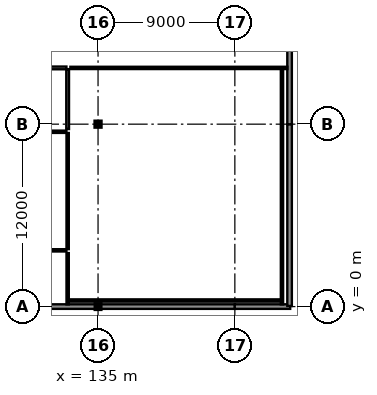
"""IFC4 building model, lengths in metres.
Left out: names, types, materials, properties, quantities, classifications, styles, units other than length and angle.
Written with IfcOpenShell. Run it as: python <this file> out.ifc"""

import sys

from ifc_helpers import new_model, si_unit, direction, frame, frame_2d, origin, origin_2d, place, context, subcontext, project, spatial, rectangle, i_section, extrude, element, fill, save


model = new_model("IFC4")
c1 = context("Model", 3, precision=1e-05, world=origin(), true_north=direction((0.0, 1.0)))
c2 = subcontext(c1, "Body", "Model", "MODEL_VIEW")
j1 = project(units=[si_unit("LENGTHUNIT", "METRE"), si_unit("PLANEANGLEUNIT", "RADIAN")], contexts=[c1])
p1 = place(None, origin())
s1 = spatial("IfcSite", under=j1, at=p1, CompositionType="ELEMENT")
p2 = place(p1, origin())
s2 = spatial("IfcBuilding", under=s1, at=p2, CompositionType="ELEMENT")
p3 = place(p2, frame((0.0, 0.0, 18.9)))
s3 = spatial("IfcBuildingStorey", under=s2, at=p3, CompositionType="ELEMENT", Elevation=18.9)
p4 = place(p3, frame((135.0, 0.0, 0.0), z_axis=(0.0, 0.0, 1.0), x_axis=(0.0, 1.0, 0.0)))
e1 = element("IfcColumn", 1, at=p4, inside=s3, PredefinedType="COLUMN", context=c2, shape_type="SweptSolid", body=[
    extrude(i_section(OverallWidth=0.28, OverallDepth=0.28, WebThickness=0.01, FlangeThickness=0.018, at=origin_2d()), origin(), (0.0, 0.0, 1.0), 4.5),
])
p5 = place(p3, frame((135.0, 12.0, 0.0), z_axis=(0.0, 0.0, 1.0), x_axis=(1.0, 0.0, 0.0)))
e2 = element("IfcColumn", 2, at=p5, inside=s3, PredefinedType="COLUMN", context=c2, shape_type="SweptSolid", body=[
    extrude(i_section(OverallWidth=0.3, OverallDepth=0.3, WebThickness=0.011, FlangeThickness=0.019, at=origin_2d()), origin(), (0.0, 0.0, 1.0), 4.5),
])
p6 = place(p3, frame((126.008, 0.0, 0.0), z_axis=(0.0, 0.0, 1.0), x_axis=(1.0, 0.0, 0.0)))
e3 = element("IfcWall", 3, at=p6, inside=s3, PredefinedType="SOLIDWALL", context=c2, shape_type="SweptSolid", body=[
    extrude(rectangle(XDim=8.854, YDim=0.3, at=frame_2d((4.427, 0.0))), origin(), (0.0, 0.0, 1.0), 3.247),
])
p7 = place(p6, frame((1.479, 0.0, 0.85)))
e4 = element("IfcOpeningElement", 4, at=p7, cuts=e3, PredefinedType="OPENING", context=c2, shape_type="SweptSolid", body=[
    extrude(rectangle(XDim=2.0, YDim=2.0, at=frame_2d((1.0, 1.0))), frame((0.0, 0.165, 0.0), z_axis=(0.0, -1.0, 0.0), x_axis=(1.0, 0.0, 0.0)), (0.0, 0.0, 1.0), 0.33),
])
p8 = place(p6, frame((4.752, 0.0, 0.85)))
e5 = element("IfcOpeningElement", 5, at=p8, cuts=e3, PredefinedType="OPENING", context=c2, shape_type="SweptSolid", body=[
    extrude(rectangle(XDim=2.0, YDim=2.0, at=frame_2d((1.0, 1.0))), frame((0.0, 0.165, 0.0), z_axis=(0.0, -1.0, 0.0), x_axis=(1.0, 0.0, 0.0)), (0.0, 0.0, 1.0), 0.33),
])
p9 = place(p3, frame((135.138, 0.0, 0.0), z_axis=(0.0, 0.0, 1.0), x_axis=(1.0, 0.0, 0.0)))
e6 = element("IfcWall", 6, at=p9, inside=s3, PredefinedType="SOLIDWALL", context=c2, shape_type="SweptSolid", body=[
    extrude(rectangle(XDim=8.872, YDim=0.3, at=frame_2d((4.436, 0.0))), origin(), (0.0, 0.0, 1.0), 3.247),
])
p10 = place(p3, frame((143.99, 0.0, 0.0), z_axis=(0.0, 0.0, 1.0), x_axis=(1.0, 0.0, 0.0)))
e7 = element("IfcWall", 7, at=p10, inside=s3, PredefinedType="SOLIDWALL", context=c2, shape_type="SweptSolid", body=[
    extrude(rectangle(XDim=3.65, YDim=0.3, at=frame_2d((1.825, 0.0))), origin(), (0.0, 0.0, 1.0), 3.247),
])
p11 = place(p3, frame((147.6, 0.04, 0.0), z_axis=(0.0, 0.0, 1.0), x_axis=(0.0, 1.0, 0.0)))
e8 = element("IfcWall", 8, at=p11, inside=s3, PredefinedType="SOLIDWALL", context=c2, shape_type="SweptSolid", body=[
    extrude(rectangle(XDim=11.97, YDim=0.3, at=frame_2d((5.985, 0.0))), origin(), (0.0, 0.0, 1.0), 3.555),
])
p12 = place(p11, frame((2.352, 0.0, 0.85)))
e9 = element("IfcOpeningElement", 9, at=p12, cuts=e8, PredefinedType="OPENING", context=c2, shape_type="SweptSolid", body=[
    extrude(rectangle(XDim=2.0, YDim=2.0, at=frame_2d((1.0, 1.0))), frame((0.0, 0.165, 0.0), z_axis=(0.0, -1.0, 0.0), x_axis=(1.0, 0.0, 0.0)), (0.0, 0.0, 1.0), 0.33),
])
p13 = place(p11, frame((7.618, 0.0, 0.85)))
e10 = element("IfcOpeningElement", 10, at=p13, cuts=e8, PredefinedType="OPENING", context=c2, shape_type="SweptSolid", body=[
    extrude(rectangle(XDim=2.0, YDim=2.0, at=frame_2d((1.0, 1.0))), frame((0.0, 0.165, 0.0), z_axis=(0.0, -1.0, 0.0), x_axis=(1.0, 0.0, 0.0)), (0.0, 0.0, 1.0), 0.33),
])
p14 = place(p3, frame((147.6, 11.99, 0.0), z_axis=(0.0, 0.0, 1.0), x_axis=(0.0, 1.0, 0.0)))
e11 = element("IfcWall", 11, at=p14, inside=s3, PredefinedType="SOLIDWALL", context=c2, shape_type="SweptSolid", body=[
    extrude(rectangle(XDim=12.05, YDim=0.3, at=frame_2d((6.025, 0.0))), origin(), (0.0, 0.0, 1.0), 3.555),
])
p15 = place(p14, frame((1.47, 0.0, 0.85)))
e12 = element("IfcOpeningElement", 12, at=p15, cuts=e11, PredefinedType="OPENING", context=c2, shape_type="SweptSolid", body=[
    extrude(rectangle(XDim=2.0, YDim=2.0, at=frame_2d((1.0, 1.0))), frame((0.0, 0.165, 0.0), z_axis=(0.0, -1.0, 0.0), x_axis=(1.0, 0.0, 0.0)), (0.0, 0.0, 1.0), 0.33),
])
p16 = place(p14, frame((7.676, 0.0, 0.85)))
e13 = element("IfcOpeningElement", 13, at=p16, cuts=e11, PredefinedType="OPENING", context=c2, shape_type="SweptSolid", body=[
    extrude(rectangle(XDim=2.0, YDim=2.0, at=frame_2d((1.0, 1.0))), frame((0.0, 0.165, 0.0), z_axis=(0.0, -1.0, 0.0), x_axis=(1.0, 0.0, 0.0)), (0.0, 0.0, 1.0), 0.33),
])
p17 = place(p3, frame((130.18, 11.5, 0.0), z_axis=(0.0, 0.0, 1.0), x_axis=(1.0, 0.0, 0.0)))
e14 = element("IfcWall", 14, at=p17, inside=s3, PredefinedType="PARTITIONING", context=c2, shape_type="SweptSolid", body=[
    extrude(rectangle(XDim=2.74, YDim=0.15, at=frame_2d((1.37, 0.0))), origin(), (0.0, 0.0, 1.0), 4.14),
])
p18 = place(p3, frame((133.0, 11.42, 0.0), z_axis=(0.0, 0.0, 1.0), x_axis=(0.0, -1.0, 0.0)))
e15 = element("IfcWall", 15, at=p18, inside=s3, PredefinedType="PARTITIONING", context=c2, shape_type="SweptSolid", body=[
    extrude(rectangle(XDim=7.64, YDim=0.15, at=frame_2d((3.82, 0.0))), origin(), (0.0, 0.0, 1.0), 4.14),
])
p19 = place(p3, frame((132.92, 3.7, 0.0), z_axis=(0.0, 0.0, 1.0), x_axis=(-1.0, 0.0, 0.0)))
e16 = element("IfcWall", 16, at=p19, inside=s3, PredefinedType="PARTITIONING", context=c2, shape_type="SweptSolid", body=[
    extrude(rectangle(XDim=15.64, YDim=0.15, at=frame_2d((7.82, 0.0))), origin(), (0.0, 0.0, 1.0), 4.14),
])
p20 = place(p3, frame((130.18, 15.7, 0.0), z_axis=(0.0, 0.0, 1.0), x_axis=(1.0, 0.0, 0.0)))
e17 = element("IfcWall", 17, at=p20, inside=s3, PredefinedType="PARTITIONING", context=c2, shape_type="SweptSolid", body=[
    extrude(rectangle(XDim=2.74, YDim=0.18, at=frame_2d((1.37, 0.0))), origin(), (0.0, 0.0, 1.0), 4.14),
])
p21 = place(p3, frame((133.0, 15.62, 0.0), z_axis=(0.0, 0.0, 1.0), x_axis=(0.0, -1.0, 0.0)))
e18 = element("IfcWall", 18, at=p21, inside=s3, PredefinedType="PARTITIONING", context=c2, shape_type="SweptSolid", body=[
    extrude(rectangle(XDim=3.94, YDim=0.18, at=frame_2d((1.97, 0.0))), origin(), (0.0, 0.0, 1.0), 4.14),
])
p22 = place(p3, frame((133.0, 0.145, 0.0), z_axis=(0.0, 0.0, 1.0), x_axis=(0.0, 1.0, 0.0)))
e19 = element("IfcWall", 19, at=p22, inside=s3, PredefinedType="PARTITIONING", context=c2, shape_type="SweptSolid", body=[
    extrude(rectangle(XDim=3.375, YDim=0.15, at=frame_2d((1.688, 0.0))), origin(), (0.0, 0.0, 1.0), 4.14),
])
p23 = place(p3, frame((133.18, 15.7, 0.0), z_axis=(0.0, 0.0, 1.0), x_axis=(1.0, 0.0, 0.0)))
e20 = element("IfcWall", 20, at=p23, inside=s3, PredefinedType="PARTITIONING", context=c2, shape_type="SweptSolid", body=[
    extrude(rectangle(XDim=14.275, YDim=0.15, at=frame_2d((7.138, 0.0))), origin(), (0.0, 0.0, 1.0), 4.14),
])
p24 = place(p23, frame((6.612, 0.0, 0.0)))
e21 = element("IfcOpeningElement", 21, at=p24, cuts=e20, PredefinedType="OPENING", context=c2, shape_type="SweptSolid", body=[
    extrude(rectangle(XDim=1.05, YDim=2.25, at=frame_2d((0.525, 1.125))), frame((0.0, 0.09, 0.0), z_axis=(0.0, -1.0, 0.0), x_axis=(1.0, 0.0, 0.0)), (0.0, 0.0, 1.0), 0.18),
])
p25 = place(p3, frame((147.1, 15.63, 0.0), z_axis=(0.0, 0.0, 1.0), x_axis=(0.0, -1.0, 0.0)))
e22 = element("IfcWall", 22, at=p25, inside=s3, PredefinedType="PARTITIONING", context=c2, shape_type="SweptSolid", body=[
    extrude(rectangle(XDim=15.485, YDim=0.15, at=frame_2d((7.742, 0.0))), origin(), (0.0, 0.0, 1.0), 4.14),
])
p26 = place(p3, frame((147.03, 0.4, 0.0), z_axis=(0.0, 0.0, 1.0), x_axis=(-1.0, 0.0, 0.0)))
e23 = element("IfcWall", 23, at=p26, inside=s3, PredefinedType="PARTITIONING", context=c2, shape_type="SweptSolid", body=[
    extrude(rectangle(XDim=13.96, YDim=0.15, at=frame_2d((6.98, 0.0))), origin(), (0.0, 0.0, 1.0), 4.14),
])
p27 = place(p8, origin())
e24 = element("IfcWindow", 24, at=p27, inside=s3, PartitioningType="SINGLE_PANEL", PredefinedType="WINDOW", context=c2, shape_type="SweptSolid", body=[
    extrude(rectangle(XDim=2.0, YDim=2.0, at=frame_2d((1.0, 1.0))), frame((0.0, 0.03, 0.0), z_axis=(0.0, -1.0, 0.0), x_axis=(1.0, 0.0, 0.0)), (0.0, 0.0, 1.0), 0.06),
])
fill(e5, e24)
p28 = place(p12, origin())
e25 = element("IfcWindow", 25, at=p28, inside=s3, PartitioningType="SINGLE_PANEL", PredefinedType="WINDOW", context=c2, shape_type="SweptSolid", body=[
    extrude(rectangle(XDim=2.0, YDim=2.0, at=frame_2d((1.0, 1.0))), frame((0.0, 0.03, 0.0), z_axis=(0.0, -1.0, 0.0), x_axis=(1.0, 0.0, 0.0)), (0.0, 0.0, 1.0), 0.06),
])
fill(e9, e25)
p29 = place(p13, origin())
e26 = element("IfcWindow", 26, at=p29, inside=s3, PartitioningType="SINGLE_PANEL", PredefinedType="WINDOW", context=c2, shape_type="SweptSolid", body=[
    extrude(rectangle(XDim=2.0, YDim=2.0, at=frame_2d((1.0, 1.0))), frame((0.0, 0.03, 0.0), z_axis=(0.0, -1.0, 0.0), x_axis=(1.0, 0.0, 0.0)), (0.0, 0.0, 1.0), 0.06),
])
fill(e10, e26)
p30 = place(p15, origin())
e27 = element("IfcWindow", 27, at=p30, inside=s3, PartitioningType="SINGLE_PANEL", PredefinedType="WINDOW", context=c2, shape_type="SweptSolid", body=[
    extrude(rectangle(XDim=2.0, YDim=2.0, at=frame_2d((1.0, 1.0))), frame((0.0, 0.03, 0.0), z_axis=(0.0, -1.0, 0.0), x_axis=(1.0, 0.0, 0.0)), (0.0, 0.0, 1.0), 0.06),
])
fill(e12, e27)
p31 = place(p24, frame((1.05, 0.0, 0.0), z_axis=(0.0, 0.0, 1.0), x_axis=(-1.0, 0.0, 0.0)))
e28 = element("IfcDoor", 28, at=p31, inside=s3, OperationType="SINGLE_SWING_RIGHT", PredefinedType="DOOR", context=c2, shape_type="SweptSolid", body=[
    extrude(rectangle(XDim=1.05, YDim=2.25, at=frame_2d((0.525, 1.125))), frame((0.0, 0.025, 0.0), z_axis=(0.0, -1.0, 0.0), x_axis=(1.0, 0.0, 0.0)), (0.0, 0.0, 1.0), 0.05),
])
fill(e21, e28)
save(model, sys.argv[1])
